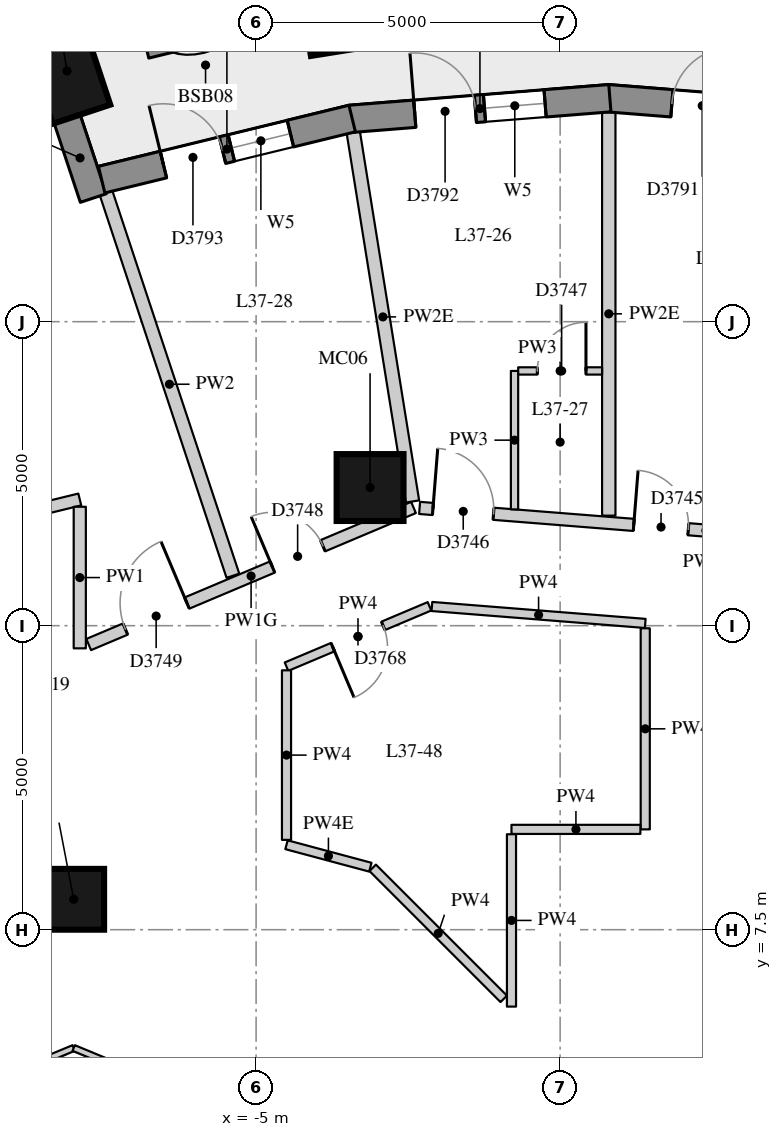
"""IFC4 building model, lengths in metres.
Left out: names, types, materials, properties, quantities, classifications, styles, units other than length and angle.
Written with IfcOpenShell. Run it as: python <this file> out.ifc"""

import sys

from ifc_helpers import new_model, si_unit, direction, frame, frame_2d, origin, origin_2d, place, context, subcontext, project, spatial, rectangle, extrude, element, fill, save


model = new_model("IFC4")
c1 = context("Model", 3, precision=1e-05, world=origin(), true_north=direction((0.0, 1.0)))
c2 = subcontext(c1, "Body", "Model", "MODEL_VIEW")
j1 = project(units=[si_unit("LENGTHUNIT", "METRE"), si_unit("PLANEANGLEUNIT", "RADIAN")], contexts=[c1])
p1 = place(None, origin())
s1 = spatial("IfcSite", under=j1, at=p1, CompositionType="ELEMENT")
p2 = place(p1, origin())
s2 = spatial("IfcBuilding", under=s1, at=p2, CompositionType="ELEMENT")
p3 = place(p2, frame((0.0, 0.0, 131.8)))
s3 = spatial("IfcBuildingStorey", under=s2, at=p3, CompositionType="ELEMENT", Elevation=131.8)
for number, where, z_axis, x_axis in (
    (1, (-3.724, 22.691, 0.0), (0.0, 0.0, 1.0), (-0.159, 0.987, 0.0)),
    (2, (-8.11, 21.624, 0.0), (0.0, 0.0, 1.0), (-0.315, 0.949, 0.0)),
):
    element("IfcColumn", number, at=place(p3, frame(where, z_axis=z_axis, x_axis=x_axis)), inside=s3, PredefinedType="COLUMN", context=c2, shape_type="SweptSolid", body=[
        extrude(rectangle(XDim=1.5, YDim=1.0, at=origin_2d()), origin(), (0.0, 0.0, 1.0), 3.3),
    ])
p4 = place(p3, frame((-8.0, 8.0, 0.0), z_axis=(0.0, 0.0, 1.0), x_axis=(1.0, 0.0, 0.0)))
e3 = element("IfcColumn", 3, at=p4, inside=s3, PredefinedType="COLUMN", context=c2, shape_type="SweptSolid", body=[
    extrude(rectangle(XDim=1.0, YDim=1.0, at=origin_2d()), origin(), (0.0, 0.0, 1.0), 3.3),
])
p5 = place(p3, frame((-3.126, 14.772, 0.0), z_axis=(0.0, 0.0, 1.0), x_axis=(1.0, 0.0, 0.0)))
e4 = element("IfcColumn", 4, at=p5, inside=s3, PredefinedType="COLUMN", context=c2, shape_type="SweptSolid", body=[
    extrude(rectangle(XDim=1.1, YDim=1.1, at=origin_2d()), origin(), (0.0, 0.0, 1.0), 3.3),
])
p6 = place(p3, frame((-8.114, 20.853, 0.0), z_axis=(0.0, 0.0, 1.0), x_axis=(0.314488854508, -0.949261165534, 0.0)))
e5 = element("IfcWall", 5, at=p6, inside=s3, PredefinedType="SOLIDWALL", context=c2, shape_type="SweptSolid", body=[
    extrude(rectangle(XDim=1.39, YDim=0.45, at=frame_2d((0.695, 0.0))), origin(), (0.0, 0.0, 1.0), 2.85),
])
p7 = place(p3, frame((5.038, 20.837, 0.0), z_axis=(0.0, 0.0, 1.0), x_axis=(-0.996839780714, 0.079438350855, 0.0)))
e6 = element("IfcWall", 6, at=p7, inside=s3, PredefinedType="SOLIDWALL", context=c2, shape_type="SweptSolid", body=[
    extrude(rectangle(XDim=4.269, YDim=0.45, at=frame_2d((2.134, 0.0))), origin(), (0.0, 0.0, 1.0), 2.85),
])
p8 = place(p7, frame((1.06, 0.0, 0.4)))
e7 = element("IfcOpeningElement", 7, at=p8, cuts=e6, PredefinedType="OPENING", context=c2, shape_type="SweptSolid", body=[
    extrude(rectangle(XDim=1.0, YDim=1.75, at=frame_2d((0.5, 0.875))), frame((0.0, 0.235, 0.0), z_axis=(0.0, -1.0, 0.0), x_axis=(1.0, 0.0, 0.0)), (0.0, 0.0, 1.0), 0.47),
])
p9 = place(p7, frame((2.209, 0.0, 0.0)))
e8 = element("IfcOpeningElement", 8, at=p9, cuts=e6, PredefinedType="OPENING", context=c2, shape_type="SweptSolid", body=[
    extrude(rectangle(XDim=1.0, YDim=2.15, at=frame_2d((0.5, 1.075))), frame((0.0, 0.235, 0.0), z_axis=(0.0, -1.0, 0.0), x_axis=(1.0, 0.0, 0.0)), (0.0, 0.0, 1.0), 0.47),
])
p10 = place(p3, frame((0.818, 21.176, 0.0), z_axis=(0.0, 0.0, 1.0), x_axis=(-0.996843824935, -0.079387585235, 0.0)))
e9 = element("IfcWall", 9, at=p10, inside=s3, PredefinedType="SOLIDWALL", context=c2, shape_type="SweptSolid", body=[
    extrude(rectangle(XDim=4.287, YDim=0.45, at=frame_2d((2.144, 0.0))), origin(), (0.0, 0.0, 1.0), 2.85),
])
p11 = place(p10, frame((1.068, 0.0, 0.4)))
e10 = element("IfcOpeningElement", 10, at=p11, cuts=e9, PredefinedType="OPENING", context=c2, shape_type="SweptSolid", body=[
    extrude(rectangle(XDim=1.0, YDim=1.75, at=frame_2d((0.5, 0.875))), frame((0.0, 0.235, 0.0), z_axis=(0.0, -1.0, 0.0), x_axis=(1.0, 0.0, 0.0)), (0.0, 0.0, 1.0), 0.47),
])
p12 = place(p10, frame((2.219, 0.0, 0.0)))
e11 = element("IfcOpeningElement", 11, at=p12, cuts=e9, PredefinedType="OPENING", context=c2, shape_type="SweptSolid", body=[
    extrude(rectangle(XDim=1.0, YDim=2.15, at=frame_2d((0.5, 1.075))), frame((0.0, 0.235, 0.0), z_axis=(0.0, -1.0, 0.0), x_axis=(1.0, 0.0, 0.0)), (0.0, 0.0, 1.0), 0.47),
])
p13 = place(p3, frame((-3.42, 20.841, 0.0), z_axis=(0.0, 0.0, 1.0), x_axis=(-0.971511611373, -0.23699195971, 0.0)))
e12 = element("IfcWall", 12, at=p13, inside=s3, PredefinedType="SOLIDWALL", context=c2, shape_type="SweptSolid", body=[
    extrude(rectangle(XDim=4.241, YDim=0.45, at=frame_2d((2.121, 0.0))), origin(), (0.0, 0.0, 1.0), 2.85),
])
p14 = place(p13, frame((1.045, 0.0, 0.4)))
e13 = element("IfcOpeningElement", 13, at=p14, cuts=e12, PredefinedType="OPENING", context=c2, shape_type="SweptSolid", body=[
    extrude(rectangle(XDim=1.0, YDim=1.75, at=frame_2d((0.5, 0.875))), frame((0.0, 0.235, 0.0), z_axis=(0.0, -1.0, 0.0), x_axis=(1.0, 0.0, 0.0)), (0.0, 0.0, 1.0), 0.47),
])
p15 = place(p13, frame((2.196, 0.0, 0.0)))
e14 = element("IfcOpeningElement", 14, at=p15, cuts=e12, PredefinedType="OPENING", context=c2, shape_type="SweptSolid", body=[
    extrude(rectangle(XDim=1.0, YDim=2.15, at=frame_2d((0.5, 1.075))), frame((0.0, 0.235, 0.0), z_axis=(0.0, -1.0, 0.0), x_axis=(1.0, 0.0, 0.0)), (0.0, 0.0, 1.0), 0.47),
])
p16 = place(p3, frame((-5.099, 22.601, 0.0), z_axis=(0.0, 0.0, 1.0), x_axis=(-0.971654974133, -0.23640349245, 0.0)))
e15 = element("IfcWall", 15, at=p16, inside=s3, PredefinedType="USERDEFINED", context=c2, shape_type="SweptSolid", body=[
    extrude(rectangle(XDim=1.8, YDim=0.7, at=frame_2d((0.9, 0.0))), origin(), (0.0, 0.0, 1.0), 0.75),
])
p17 = place(p3, frame((-9.884, 14.092, 0.0), z_axis=(0.0, 0.0, 1.0), x_axis=(0.971512281799, 0.236989211388, 0.0)))
e16 = element("IfcWall", 16, at=p17, inside=s3, PredefinedType="PARTITIONING", context=c2, shape_type="SweptSolid", body=[
    extrude(rectangle(XDim=2.042, YDim=0.2, at=frame_2d((1.021, 0.0))), origin(), (0.0, 0.0, 1.0), 2.85),
])
p18 = place(p3, frame((-7.9, 14.456, 0.0), z_axis=(0.0, 0.0, 1.0), x_axis=(0.0, -1.0, 0.0)))
e17 = element("IfcWall", 17, at=p18, inside=s3, PredefinedType="PARTITIONING", context=c2, shape_type="SweptSolid", body=[
    extrude(rectangle(XDim=2.328, YDim=0.2, at=frame_2d((1.164, 0.0))), origin(), (0.0, 0.0, 1.0), 2.85),
])
p19 = place(p3, frame((-7.753, 12.19, 0.0), z_axis=(0.0, 0.0, 1.0), x_axis=(0.921319622993, 0.388806059994, 0.0)))
e18 = element("IfcWall", 18, at=p19, inside=s3, PredefinedType="PARTITIONING", context=c2, shape_type="SweptSolid", body=[
    extrude(rectangle(XDim=5.798, YDim=0.2, at=frame_2d((2.899, 0.0))), origin(), (0.0, 0.0, 1.0), 2.4),
])
p20 = place(p19, frame((3.28, 0.0, 0.0)))
e19 = element("IfcOpeningElement", 19, at=p20, cuts=e18, PredefinedType="OPENING", context=c2, shape_type="SweptSolid", body=[
    extrude(rectangle(XDim=0.9, YDim=2.1, at=frame_2d((0.45, 1.05))), frame((0.0, 0.11, 0.0), z_axis=(0.0, -1.0, 0.0), x_axis=(1.0, 0.0, 0.0)), (0.0, 0.0, 1.0), 0.22),
])
p21 = place(p19, frame((0.654, 0.0, 0.0)))
e20 = element("IfcOpeningElement", 20, at=p21, cuts=e18, PredefinedType="OPENING", context=c2, shape_type="SweptSolid", body=[
    extrude(rectangle(XDim=1.1, YDim=2.1, at=frame_2d((0.55, 1.05))), frame((0.0, 0.11, 0.0), z_axis=(0.0, -1.0, 0.0), x_axis=(1.0, 0.0, 0.0)), (0.0, 0.0, 1.0), 0.22),
])
p22 = place(p3, frame((-2.311, 14.437, 0.0), z_axis=(0.0, 0.0, 1.0), x_axis=(0.996870762165, -0.079048615048, 0.0)))
e21 = element("IfcWall", 21, at=p22, inside=s3, PredefinedType="PARTITIONING", context=c2, shape_type="SweptSolid", body=[
    extrude(rectangle(XDim=9.445, YDim=0.2, at=frame_2d((4.722, 0.0))), origin(), (0.0, 0.0, 1.0), 2.25),
])
p23 = place(p22, frame((6.471, 0.0, 0.0)))
e22 = element("IfcOpeningElement", 22, at=p23, cuts=e21, PredefinedType="OPENING", context=c2, shape_type="SweptSolid", body=[
    extrude(rectangle(XDim=1.0, YDim=2.1, at=frame_2d((0.5, 1.05))), frame((0.0, 0.11, 0.0), z_axis=(0.0, -1.0, 0.0), x_axis=(1.0, 0.0, 0.0)), (0.0, 0.0, 1.0), 0.22),
])
p24 = place(p22, frame((3.533, 0.0, 0.0)))
e23 = element("IfcOpeningElement", 23, at=p24, cuts=e21, PredefinedType="OPENING", context=c2, shape_type="SweptSolid", body=[
    extrude(rectangle(XDim=0.9, YDim=2.1, at=frame_2d((0.45, 1.05))), frame((0.0, 0.11, 0.0), z_axis=(0.0, -1.0, 0.0), x_axis=(1.0, 0.0, 0.0)), (0.0, 0.0, 1.0), 0.22),
])
p25 = place(p22, frame((0.22, 0.0, 0.0)))
e24 = element("IfcOpeningElement", 24, at=p25, cuts=e21, PredefinedType="OPENING", context=c2, shape_type="SweptSolid", body=[
    extrude(rectangle(XDim=1.0, YDim=2.1, at=frame_2d((0.5, 1.05))), frame((0.0, 0.11, 0.0), z_axis=(0.0, -1.0, 0.0), x_axis=(1.0, 0.0, 0.0)), (0.0, 0.0, 1.0), 0.22),
])
p26 = place(p3, frame((-4.5, 11.826, 0.0), z_axis=(0.0, 0.0, 1.0), x_axis=(0.921264033472, 0.388937759329, 0.0)))
e25 = element("IfcWall", 25, at=p26, inside=s3, PredefinedType="PARTITIONING", context=c2, shape_type="SweptSolid", body=[
    extrude(rectangle(XDim=2.552, YDim=0.15, at=frame_2d((1.276, 0.0))), origin(), (0.0, 0.0, 1.0), 2.85),
])
p27 = place(p26, frame((0.826, 0.0, 0.0)))
e26 = element("IfcOpeningElement", 26, at=p27, cuts=e25, PredefinedType="OPENING", context=c2, shape_type="SweptSolid", body=[
    extrude(rectangle(XDim=0.9, YDim=2.1, at=frame_2d((0.45, 1.05))), frame((0.0, 0.085, 0.0), z_axis=(0.0, -1.0, 0.0), x_axis=(1.0, 0.0, 0.0)), (0.0, 0.0, 1.0), 0.17),
])
p28 = place(p3, frame((-2.109, 12.816, 0.0), z_axis=(0.0, 0.0, 1.0), x_axis=(0.996868431192, -0.079078005119, 0.0)))
e27 = element("IfcWall", 27, at=p28, inside=s3, PredefinedType="PARTITIONING", context=c2, shape_type="SweptSolid", body=[
    extrude(rectangle(XDim=3.52, YDim=0.15, at=frame_2d((1.76, 0.0))), origin(), (0.0, 0.0, 1.0), 2.85),
])
p29 = place(p3, frame((1.4, 12.457, 0.0), z_axis=(0.0, 0.0, 1.0), x_axis=(0.0, -1.0, 0.0)))
e28 = element("IfcWall", 28, at=p29, inside=s3, PredefinedType="PARTITIONING", context=c2, shape_type="SweptSolid", body=[
    extrude(rectangle(XDim=3.307, YDim=0.15, at=frame_2d((1.654, 0.0))), origin(), (0.0, 0.0, 1.0), 2.85),
])
p30 = place(p3, frame((1.32, 9.15, 0.0), z_axis=(0.0, 0.0, 1.0), x_axis=(-1.0, 0.0, 0.0)))
e29 = element("IfcWall", 29, at=p30, inside=s3, PredefinedType="PARTITIONING", context=c2, shape_type="SweptSolid", body=[
    extrude(rectangle(XDim=2.12, YDim=0.15, at=frame_2d((1.06, 0.0))), origin(), (0.0, 0.0, 1.0), 2.85),
])
p31 = place(p3, frame((-0.8, 9.07, 0.0), z_axis=(0.0, 0.0, 1.0), x_axis=(0.0, -1.0, 0.0)))
e30 = element("IfcWall", 30, at=p31, inside=s3, PredefinedType="PARTITIONING", context=c2, shape_type="SweptSolid", body=[
    extrude(rectangle(XDim=2.835, YDim=0.15, at=frame_2d((1.417, 0.0))), origin(), (0.0, 0.0, 1.0), 2.85),
])
p32 = place(p3, frame((-0.927, 6.363, 0.0), z_axis=(0.0, 0.0, 1.0), x_axis=(-0.707106781187, 0.707106781187, 0.0)))
e31 = element("IfcWall", 31, at=p32, inside=s3, PredefinedType="PARTITIONING", context=c2, shape_type="SweptSolid", body=[
    extrude(rectangle(XDim=3.048, YDim=0.15, at=frame_2d((1.524, 0.0))), origin(), (0.0, 0.0, 1.0), 2.85),
])
p33 = place(p3, frame((-3.121, 8.528, 0.0), z_axis=(0.0, 0.0, 1.0), x_axis=(-0.965941945062, 0.258758881529, 0.0)))
e32 = element("IfcWall", 32, at=p33, inside=s3, PredefinedType="PARTITIONING", context=c2, shape_type="SweptSolid", body=[
    extrude(rectangle(XDim=1.427, YDim=0.15, at=frame_2d((0.714, 0.0))), origin(), (0.0, 0.0, 1.0), 2.3),
])
p34 = place(p3, frame((-4.5, 8.977, 0.0), z_axis=(0.0, 0.0, 1.0), x_axis=(0.0, 1.0, 0.0)))
e33 = element("IfcWall", 33, at=p34, inside=s3, PredefinedType="PARTITIONING", context=c2, shape_type="SweptSolid", body=[
    extrude(rectangle(XDim=2.789, YDim=0.15, at=frame_2d((1.394, 0.0))), origin(), (0.0, 0.0, 1.0), 2.85),
])
p35 = place(p3, frame((0.8, 20.948, 0.0), z_axis=(0.0, 0.0, 1.0), x_axis=(0.0, -1.0, 0.0)))
e34 = element("IfcWall", 34, at=p35, inside=s3, PredefinedType="PARTITIONING", context=c2, shape_type="SweptSolid", body=[
    extrude(rectangle(XDim=6.638, YDim=0.22, at=frame_2d((3.319, 0.0))), origin(), (0.0, 0.0, 1.0), 2.4),
])
p36 = place(p3, frame((-3.402, 20.614, 0.0), z_axis=(0.0, 0.0, 1.0), x_axis=(0.158510822082, -0.987357239951, 0.0)))
e35 = element("IfcWall", 35, at=p36, inside=s3, PredefinedType="PARTITIONING", context=c2, shape_type="SweptSolid", body=[
    extrude(rectangle(XDim=6.148, YDim=0.22, at=frame_2d((3.074, 0.0))), origin(), (0.0, 0.0, 1.0), 2.4),
])
p37 = place(p3, frame((-7.469, 19.622, 0.0), z_axis=(0.0, 0.0, 1.0), x_axis=(0.314539081996, -0.949244523765, 0.0)))
e36 = element("IfcWall", 36, at=p37, inside=s3, PredefinedType="PARTITIONING", context=c2, shape_type="SweptSolid", body=[
    extrude(rectangle(XDim=6.638, YDim=0.22, at=frame_2d((3.319, 0.0))), origin(), (0.0, 0.0, 1.0), 2.85),
])
p38 = place(p3, frame((-0.75, 14.413, 0.0), z_axis=(0.0, 0.0, 1.0), x_axis=(0.0, 1.0, 0.0)))
e37 = element("IfcWall", 37, at=p38, inside=s3, PredefinedType="PARTITIONING", context=c2, shape_type="SweptSolid", body=[
    extrude(rectangle(XDim=2.277, YDim=0.12, at=frame_2d((1.138, 0.0))), origin(), (0.0, 0.0, 1.0), 2.85),
])
p39 = place(p3, frame((-0.69, 16.69, 0.0), z_axis=(0.0, 0.0, 1.0), x_axis=(1.0, 0.0, 0.0)))
e38 = element("IfcWall", 38, at=p39, inside=s3, PredefinedType="PARTITIONING", context=c2, shape_type="SweptSolid", body=[
    extrude(rectangle(XDim=1.38, YDim=0.12, at=frame_2d((0.69, 0.0))), origin(), (0.0, 0.0, 1.0), 2.85),
])
p40 = place(p39, frame((0.315, 0.0, 0.0)))
e39 = element("IfcOpeningElement", 39, at=p40, cuts=e38, PredefinedType="OPENING", context=c2, shape_type="SweptSolid", body=[
    extrude(rectangle(XDim=0.8, YDim=2.1, at=frame_2d((0.4, 1.05))), frame((0.0, 0.07, 0.0), z_axis=(0.0, -1.0, 0.0), x_axis=(1.0, 0.0, 0.0)), (0.0, 0.0, 1.0), 0.14),
])
for number, where, z_axis, x_axis in (
    (40, (-11.927, 3.927, 0.0), (0.0, 0.0, 1.0), (0.924, 0.383, 0.0)),
    (41, (-8.0, 5.554, 0.0), (0.0, 0.0, 1.0), (0.924, -0.383, 0.0)),
):
    element("IfcWall", number, at=place(p3, frame(where, z_axis=z_axis, x_axis=x_axis)), inside=s3, PredefinedType="PARTITIONING", context=c2, shape_type="SweptSolid", body=[
        extrude(rectangle(XDim=4.251, YDim=0.1, at=frame_2d((2.125, 0.0))), origin(), (0.0, 0.0, 1.0), 2.85),
    ])
p41 = place(p9, frame((1.0, 0.0, 0.0), z_axis=(0.0, 0.0, 1.0), x_axis=(-1.0, 0.0, 0.0)))
e42 = element("IfcDoor", 42, at=p41, inside=s3, OperationType="SINGLE_SWING_RIGHT", PredefinedType="DOOR", context=c2, shape_type="SweptSolid", body=[
    extrude(rectangle(XDim=1.0, YDim=2.15, at=frame_2d((0.5, 1.075))), frame((0.0, 0.075, 0.0), z_axis=(0.0, -1.0, 0.0), x_axis=(1.0, 0.0, 0.0)), (0.0, 0.0, 1.0), 0.05),
])
fill(e8, e42)
p42 = place(p11, origin())
e43 = element("IfcWindow", 43, at=p42, inside=s3, PartitioningType="SINGLE_PANEL", PredefinedType="WINDOW", context=c2, shape_type="SweptSolid", body=[
    extrude(rectangle(XDim=1.0, YDim=1.75, at=frame_2d((0.5, 0.875))), frame((0.0, 0.035, 0.0), z_axis=(0.0, -1.0, 0.0), x_axis=(1.0, 0.0, 0.0)), (0.0, 0.0, 1.0), 0.06),
])
fill(e10, e43)
p43 = place(p12, frame((1.0, 0.0, 0.0), z_axis=(0.0, 0.0, 1.0), x_axis=(-1.0, 0.0, 0.0)))
e44 = element("IfcDoor", 44, at=p43, inside=s3, OperationType="SINGLE_SWING_LEFT", PredefinedType="DOOR", context=c2, shape_type="SweptSolid", body=[
    extrude(rectangle(XDim=1.0, YDim=2.15, at=frame_2d((0.5, 1.075))), frame((0.0, 0.075, 0.0), z_axis=(0.0, -1.0, 0.0), x_axis=(1.0, 0.0, 0.0)), (0.0, 0.0, 1.0), 0.05),
])
fill(e11, e44)
p44 = place(p14, origin())
e45 = element("IfcWindow", 45, at=p44, inside=s3, PartitioningType="SINGLE_PANEL", PredefinedType="WINDOW", context=c2, shape_type="SweptSolid", body=[
    extrude(rectangle(XDim=1.0, YDim=1.75, at=frame_2d((0.5, 0.875))), frame((0.0, 0.035, 0.0), z_axis=(0.0, -1.0, 0.0), x_axis=(1.0, 0.0, 0.0)), (0.0, 0.0, 1.0), 0.06),
])
fill(e13, e45)
p45 = place(p15, frame((1.0, 0.0, 0.0), z_axis=(0.0, 0.0, 1.0), x_axis=(-1.0, 0.0, 0.0)))
e46 = element("IfcDoor", 46, at=p45, inside=s3, OperationType="SINGLE_SWING_LEFT", PredefinedType="DOOR", context=c2, shape_type="SweptSolid", body=[
    extrude(rectangle(XDim=1.0, YDim=2.15, at=frame_2d((0.5, 1.075))), frame((0.0, 0.075, 0.0), z_axis=(0.0, -1.0, 0.0), x_axis=(1.0, 0.0, 0.0)), (0.0, 0.0, 1.0), 0.05),
])
fill(e14, e46)
p46 = place(p24, origin())
e47 = element("IfcDoor", 47, at=p46, inside=s3, OperationType="SINGLE_SWING_LEFT", PredefinedType="DOOR", context=c2, shape_type="SweptSolid", body=[
    extrude(rectangle(XDim=0.9, YDim=2.1, at=frame_2d((0.45, 1.05))), frame((0.0, 0.025, 0.0), z_axis=(0.0, -1.0, 0.0), x_axis=(1.0, 0.0, 0.0)), (0.0, 0.0, 1.0), 0.05),
])
fill(e23, e47)
p47 = place(p25, origin())
e48 = element("IfcDoor", 48, at=p47, inside=s3, OperationType="SINGLE_SWING_LEFT", PredefinedType="DOOR", context=c2, shape_type="SweptSolid", body=[
    extrude(rectangle(XDim=1.0, YDim=2.1, at=frame_2d((0.5, 1.05))), frame((0.0, 0.025, 0.0), z_axis=(0.0, -1.0, 0.0), x_axis=(1.0, 0.0, 0.0)), (0.0, 0.0, 1.0), 0.05),
])
fill(e24, e48)
p48 = place(p40, origin())
e49 = element("IfcDoor", 49, at=p48, inside=s3, OperationType="SINGLE_SWING_RIGHT", PredefinedType="DOOR", context=c2, shape_type="SweptSolid", body=[
    extrude(rectangle(XDim=0.8, YDim=2.1, at=frame_2d((0.4, 1.05))), frame((0.0, 0.025, 0.0), z_axis=(0.0, -1.0, 0.0), x_axis=(1.0, 0.0, 0.0)), (0.0, 0.0, 1.0), 0.05),
])
fill(e39, e49)
p49 = place(p20, origin())
e50 = element("IfcDoor", 50, at=p49, inside=s3, OperationType="SINGLE_SWING_LEFT", PredefinedType="DOOR", context=c2, shape_type="SweptSolid", body=[
    extrude(rectangle(XDim=0.9, YDim=2.1, at=frame_2d((0.45, 1.05))), frame((0.0, 0.025, 0.0), z_axis=(0.0, -1.0, 0.0), x_axis=(1.0, 0.0, 0.0)), (0.0, 0.0, 1.0), 0.05),
])
fill(e19, e50)
p50 = place(p21, origin())
e51 = element("IfcDoor", 51, at=p50, inside=s3, OperationType="SINGLE_SWING_RIGHT", PredefinedType="DOOR", context=c2, shape_type="SweptSolid", body=[
    extrude(rectangle(XDim=1.1, YDim=2.1, at=frame_2d((0.55, 1.05))), frame((0.0, 0.025, 0.0), z_axis=(0.0, -1.0, 0.0), x_axis=(1.0, 0.0, 0.0)), (0.0, 0.0, 1.0), 0.05),
])
fill(e20, e51)
p51 = place(p27, origin())
e52 = element("IfcDoor", 52, at=p51, inside=s3, OperationType="SINGLE_SWING_RIGHT", PredefinedType="DOOR", context=c2, shape_type="SweptSolid", body=[
    extrude(rectangle(XDim=0.9, YDim=2.1, at=frame_2d((0.45, 1.05))), frame((0.0, 0.025, 0.0), z_axis=(0.0, -1.0, 0.0), x_axis=(1.0, 0.0, 0.0)), (0.0, 0.0, 1.0), 0.05),
])
fill(e26, e52)
save(model, sys.argv[1])
